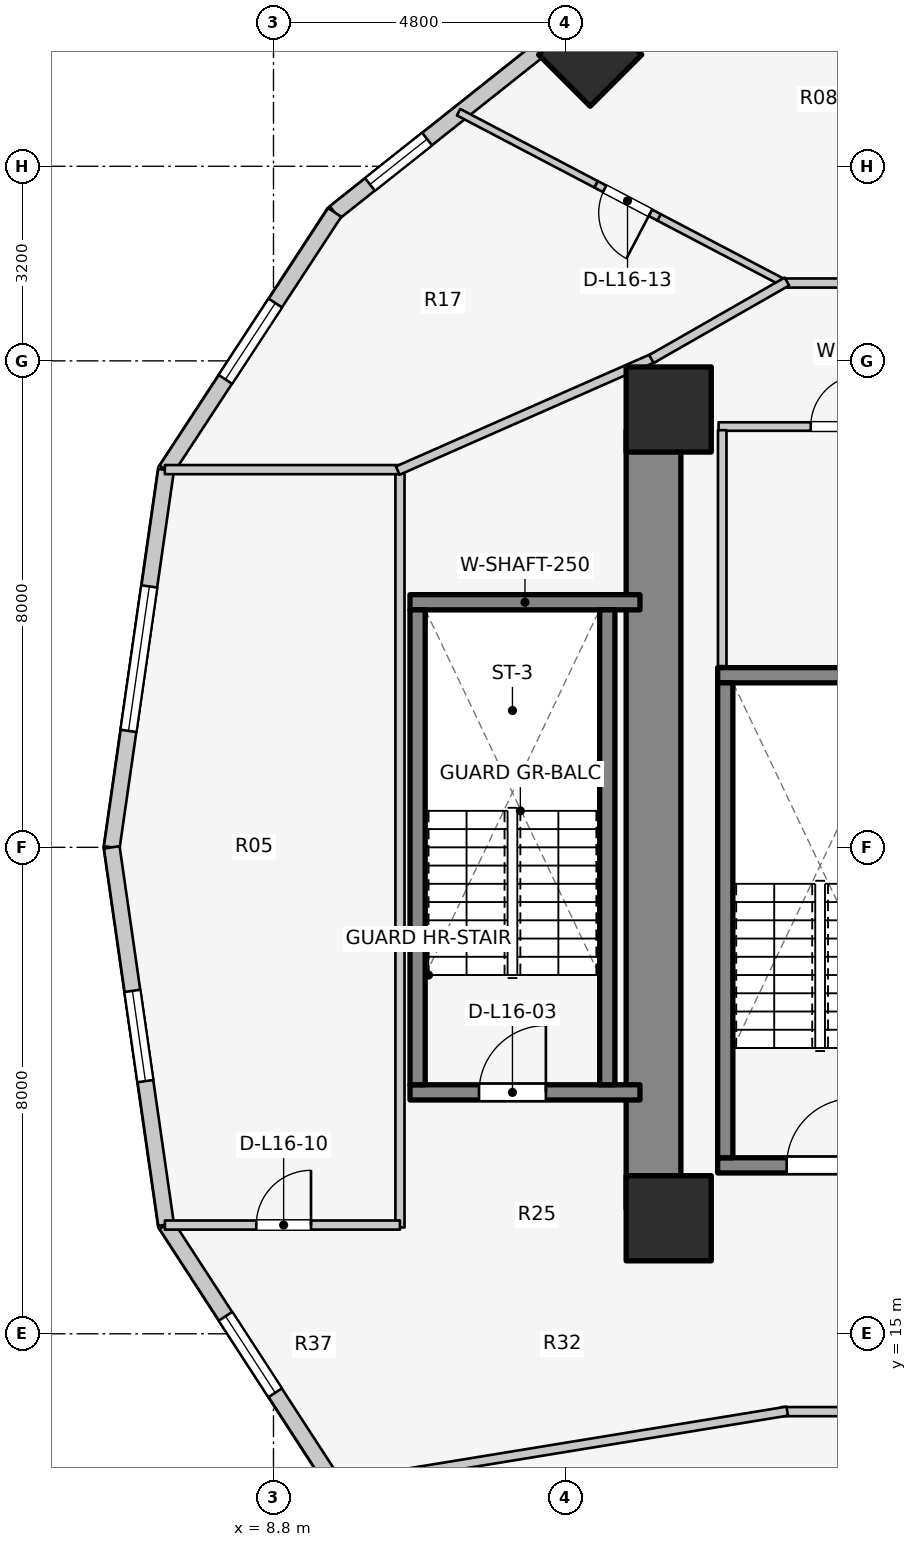
"""IFC4 building model, lengths in metres.
Left out: names, types, materials, properties, quantities, classifications, styles, units other than length and angle.
Written with IfcOpenShell. Run it as: python <this file> out.ifc"""

import sys

from ifc_helpers import new_model, si_unit, direction, frame, frame_2d, origin, origin_2d, place, context, subcontext, project, spatial, rectangle, extrude, element, fill, save


model = new_model("IFC4")
c1 = context("Model", 3, precision=1e-05, world=origin(), true_north=direction((0.0, 1.0)))
c2 = subcontext(c1, "Body", "Model", "MODEL_VIEW")
j1 = project(units=[si_unit("LENGTHUNIT", "METRE"), si_unit("PLANEANGLEUNIT", "RADIAN")], contexts=[c1])
p1 = place(None, origin())
s1 = spatial("IfcSite", under=j1, at=p1, CompositionType="ELEMENT")
p2 = place(p1, origin())
s2 = spatial("IfcBuilding", under=s1, at=p2, CompositionType="ELEMENT")
p3 = place(p2, frame((0.0, 0.0, 55.5)))
s3 = spatial("IfcBuildingStorey", under=s2, at=p3, CompositionType="ELEMENT", Elevation=55.5)
p4 = place(p3, frame((15.05, 17.05, 0.0), z_axis=(0.0, 0.0, 1.0), x_axis=(0.0, 1.0, 0.0)))
e1 = element("IfcWall", 1, at=p4, inside=s3, PredefinedType="SHEAR", context=c2, shape_type="SweptSolid", body=[
    extrude(rectangle(XDim=12.8, YDim=0.9, at=frame_2d((6.4, 0.0))), origin(), (0.0, 0.0, 1.0), 3.1),
])
p5 = place(p3, frame((16.105, 17.77, 0.0), z_axis=(0.0, 0.0, 1.0), x_axis=(1.0, 0.0, 0.0)))
e2 = element("IfcWall", 2, at=p5, inside=s3, PredefinedType="SOLIDWALL", context=c2, shape_type="SweptSolid", body=[
    extrude(rectangle(XDim=3.37, YDim=0.25, at=frame_2d((1.685, 0.0))), origin(), (0.0, 0.0, 1.0), 3.1),
])
p6 = place(p5, frame((1.135, 0.0, 0.0)))
e3 = element("IfcOpeningElement", 3, at=p6, cuts=e2, PredefinedType="OPENING", context=c2, shape_type="SweptSolid", body=[
    extrude(rectangle(XDim=1.1, YDim=2.1, at=frame_2d((0.55, 1.05))), frame((0.0, 0.135, 0.0), z_axis=(0.0, -1.0, 0.0), x_axis=(1.0, 0.0, 0.0)), (0.0, 0.0, 1.0), 0.27),
])
p7 = place(p3, frame((16.105, 25.83, 0.0), z_axis=(0.0, 0.0, 1.0), x_axis=(1.0, 0.0, 0.0)))
e4 = element("IfcWall", 4, at=p7, inside=s3, PredefinedType="SOLIDWALL", context=c2, shape_type="SweptSolid", body=[
    extrude(rectangle(XDim=3.37, YDim=0.25, at=frame_2d((1.685, 0.0))), origin(), (0.0, 0.0, 1.0), 3.1),
])
p8 = place(p3, frame((16.23, 17.895, 0.0), z_axis=(0.0, 0.0, 1.0), x_axis=(0.0, 1.0, 0.0)))
e5 = element("IfcWall", 5, at=p8, inside=s3, PredefinedType="SOLIDWALL", context=c2, shape_type="SweptSolid", body=[
    extrude(rectangle(XDim=7.81, YDim=0.25, at=frame_2d((3.905, 0.0))), origin(), (0.0, 0.0, 1.0), 3.1),
])
p9 = place(p3, frame((11.045, 18.97, 0.0), z_axis=(0.0, 0.0, 1.0), x_axis=(1.0, 0.0, 0.0)))
e6 = element("IfcWall", 6, at=p9, inside=s3, PredefinedType="SOLIDWALL", context=c2, shape_type="SweptSolid", body=[
    extrude(rectangle(XDim=3.782, YDim=0.25, at=frame_2d((1.891, 0.0))), origin(), (0.0, 0.0, 1.0), 3.1),
])
p10 = place(p9, frame((1.135, 0.0, 0.0)))
e7 = element("IfcOpeningElement", 7, at=p10, cuts=e6, PredefinedType="OPENING", context=c2, shape_type="SweptSolid", body=[
    extrude(rectangle(XDim=1.1, YDim=2.1, at=frame_2d((0.55, 1.05))), frame((0.0, 0.135, 0.0), z_axis=(0.0, -1.0, 0.0), x_axis=(1.0, 0.0, 0.0)), (0.0, 0.0, 1.0), 0.27),
])
p11 = place(p3, frame((11.045, 27.03, 0.0), z_axis=(0.0, 0.0, 1.0), x_axis=(1.0, 0.0, 0.0)))
e8 = element("IfcWall", 8, at=p11, inside=s3, PredefinedType="SOLIDWALL", context=c2, shape_type="SweptSolid", body=[
    extrude(rectangle(XDim=3.782, YDim=0.25, at=frame_2d((1.891, 0.0))), origin(), (0.0, 0.0, 1.0), 3.1),
])
for number, where, z_axis, x_axis in (
    (9, (11.17, 19.095, 0.0), (0.0, 0.0, 1.0), (0.0, 1.0, 0.0)),
    (10, (14.29, 19.095, 0.0), (0.0, 0.0, 1.0), (0.0, 1.0, 0.0)),
):
    element("IfcWall", number, at=place(p3, frame(where, z_axis=z_axis, x_axis=x_axis)), inside=s3, PredefinedType="SOLIDWALL", context=c2, shape_type="SweptSolid", body=[
        extrude(rectangle(XDim=7.81, YDim=0.25, at=frame_2d((3.905, 0.0))), origin(), (0.0, 0.0, 1.0), 3.1),
    ])
for number, where, z_axis, x_axis in (
    (11, (15.3, 16.9, 0.0), (0.0, 0.0, 1.0), (1.0, 0.0, 0.0)),
    (12, (15.3, 30.2, 0.0), (0.0, 0.0, 1.0), (1.0, 0.0, 0.0)),
):
    element("IfcColumn", number, at=place(p3, frame(where, z_axis=z_axis, x_axis=x_axis)), inside=s3, PredefinedType="COLUMN", context=c2, shape_type="SweptSolid", body=[
        extrude(rectangle(XDim=1.4, YDim=1.4, at=origin_2d()), origin(), (0.0, 0.0, 1.0), 3.1),
    ])
p12 = place(p3, frame((14.008, 36.035, 0.0), z_axis=(0.0, 0.0, 1.0), x_axis=(-0.707106781187, 0.707106781187, 0.0)))
e13 = element("IfcColumn", 13, at=p12, inside=s3, PredefinedType="COLUMN", context=c2, shape_type="SweptSolid", body=[
    extrude(rectangle(XDim=1.2, YDim=1.2, at=origin_2d()), origin(), (0.0, 0.0, 1.0), 3.1),
])
p13 = place(p3, frame((13.595, 36.45, 0.0), z_axis=(0.0, 0.0, 1.0), x_axis=(-0.783123133379, -0.621866672179, 0.0)))
e14 = element("IfcWall", 14, at=p13, inside=s3, PredefinedType="STANDARD", context=c2, shape_type="SweptSolid", body=[
    extrude(rectangle(XDim=4.839, YDim=0.26, at=frame_2d((2.419, 0.0))), origin(), (0.0, 0.0, 1.0), 2.85),
])
p14 = place(p13, frame((2.898, 0.0, 0.75)))
e15 = element("IfcOpeningElement", 15, at=p14, cuts=e14, PredefinedType="OPENING", context=c2, shape_type="SweptSolid", body=[
    extrude(rectangle(XDim=1.2, YDim=1.5, at=frame_2d((0.6, 0.75))), frame((0.0, 0.14, 0.0), z_axis=(0.0, -1.0, 0.0), x_axis=(1.0, 0.0, 0.0)), (0.0, 0.0, 1.0), 0.28),
])
p15 = place(p3, frame((9.806, 33.441, 0.0), z_axis=(0.0, 0.0, 1.0), x_axis=(-0.547702757047, -0.836672988642, 0.0)))
e16 = element("IfcWall", 16, at=p15, inside=s3, PredefinedType="STANDARD", context=c2, shape_type="SweptSolid", body=[
    extrude(rectangle(XDim=5.062, YDim=0.26, at=frame_2d((2.531, 0.0))), origin(), (0.0, 0.0, 1.0), 2.85),
])
p16 = place(p15, frame((1.781, 0.0, 0.75)))
e17 = element("IfcOpeningElement", 17, at=p16, cuts=e16, PredefinedType="OPENING", context=c2, shape_type="SweptSolid", body=[
    extrude(rectangle(XDim=1.5, YDim=1.6, at=frame_2d((0.75, 0.8))), frame((0.0, 0.14, 0.0), z_axis=(0.0, -1.0, 0.0), x_axis=(1.0, 0.0, 0.0)), (0.0, 0.0, 1.0), 0.28),
])
p17 = place(p3, frame((7.033, 29.205, 0.0), z_axis=(0.0, 0.0, 1.0), x_axis=(-0.142528001686, -0.989790770181, 0.0)))
e18 = element("IfcWall", 18, at=p17, inside=s3, PredefinedType="STANDARD", context=c2, shape_type="SweptSolid", body=[
    extrude(rectangle(XDim=6.269, YDim=0.26, at=frame_2d((3.135, 0.0))), origin(), (0.0, 0.0, 1.0), 2.85),
])
p18 = place(p17, frame((1.935, 0.0, 0.75)))
e19 = element("IfcOpeningElement", 19, at=p18, cuts=e18, PredefinedType="OPENING", context=c2, shape_type="SweptSolid", body=[
    extrude(rectangle(XDim=2.4, YDim=1.7, at=frame_2d((1.2, 0.85))), frame((0.0, 0.14, 0.0), z_axis=(0.0, -1.0, 0.0), x_axis=(1.0, 0.0, 0.0)), (0.0, 0.0, 1.0), 0.28),
])
p19 = place(p3, frame((6.14, 23.0, 0.0), z_axis=(0.0, 0.0, 1.0), x_axis=(0.142528001686, -0.989790770181, 0.0)))
e20 = element("IfcWall", 20, at=p19, inside=s3, PredefinedType="STANDARD", context=c2, shape_type="SweptSolid", body=[
    extrude(rectangle(XDim=6.269, YDim=0.26, at=frame_2d((3.135, 0.0))), origin(), (0.0, 0.0, 1.0), 2.85),
])
p20 = place(p19, frame((2.385, 0.0, 0.75)))
e21 = element("IfcOpeningElement", 21, at=p20, cuts=e20, PredefinedType="OPENING", context=c2, shape_type="SweptSolid", body=[
    extrude(rectangle(XDim=1.5, YDim=1.6, at=frame_2d((0.75, 0.8))), frame((0.0, 0.14, 0.0), z_axis=(0.0, -1.0, 0.0), x_axis=(1.0, 0.0, 0.0)), (0.0, 0.0, 1.0), 0.28),
])
p21 = place(p3, frame((7.033, 16.795, 0.0), z_axis=(0.0, 0.0, 1.0), x_axis=(0.544578722263, -0.838709732421, 0.0)))
e22 = element("IfcWall", 22, at=p21, inside=s3, PredefinedType="STANDARD", context=c2, shape_type="SweptSolid", body=[
    extrude(rectangle(XDim=5.092, YDim=0.26, at=frame_2d((2.546, 0.0))), origin(), (0.0, 0.0, 1.0), 2.85),
])
p22 = place(p21, frame((1.796, 0.0, 0.75)))
e23 = element("IfcOpeningElement", 23, at=p22, cuts=e22, PredefinedType="OPENING", context=c2, shape_type="SweptSolid", body=[
    extrude(rectangle(XDim=1.5, YDim=1.6, at=frame_2d((0.75, 0.8))), frame((0.0, 0.14, 0.0), z_axis=(0.0, -1.0, 0.0), x_axis=(1.0, 0.0, 0.0)), (0.0, 0.0, 1.0), 0.28),
])
p23 = place(p3, frame((16.12, 29.92, 0.0), z_axis=(0.0, 0.0, 1.0), x_axis=(1.0, 0.0, 0.0)))
e24 = element("IfcWall", 24, at=p23, inside=s3, PredefinedType="PLUMBINGWALL", context=c2, shape_type="SweptSolid", body=[
    extrude(rectangle(XDim=3.3, YDim=0.14, at=frame_2d((1.65, 0.0))), origin(), (0.0, 0.0, 1.0), 2.855),
])
p24 = place(p23, frame((1.516, 0.0, 0.0)))
e25 = element("IfcOpeningElement", 25, at=p24, cuts=e24, PredefinedType="OPENING", context=c2, shape_type="SweptSolid", body=[
    extrude(rectangle(XDim=0.85, YDim=2.05, at=frame_2d((0.425, 1.025))), frame((0.0, 0.08, 0.0), z_axis=(0.0, -1.0, 0.0), x_axis=(1.0, 0.0, 0.0)), (0.0, 0.0, 1.0), 0.16),
])
p25 = place(p3, frame((16.18, 25.98, 0.0), z_axis=(0.0, 0.0, 1.0), x_axis=(0.0, 1.0, 0.0)))
e26 = element("IfcWall", 26, at=p25, inside=s3, PredefinedType="PLUMBINGWALL", context=c2, shape_type="SweptSolid", body=[
    extrude(rectangle(XDim=3.88, YDim=0.14, at=frame_2d((1.94, 0.0))), origin(), (0.0, 0.0, 1.0), 2.855),
])
p26 = place(p3, frame((10.88, 16.748, 0.0), z_axis=(0.0, 0.0, 1.0), x_axis=(0.0, 1.0, 0.0)))
e27 = element("IfcWall", 27, at=p26, inside=s3, PredefinedType="PARTITIONING", context=c2, shape_type="SweptSolid", body=[
    extrude(rectangle(XDim=12.503, YDim=0.15, at=frame_2d((6.252, 0.0))), origin(), (0.0, 0.0, 1.0), 2.12),
])
p27 = place(p3, frame((7.014, 16.788, 0.0), z_axis=(0.0, 0.0, 1.0), x_axis=(1.0, 0.0, 0.0)))
e28 = element("IfcWall", 28, at=p27, inside=s3, PredefinedType="PARTITIONING", context=c2, shape_type="SweptSolid", body=[
    extrude(rectangle(XDim=3.866, YDim=0.15, at=frame_2d((1.933, 0.0))), origin(), (0.0, 0.0, 1.0), 2.855),
])
p28 = place(p27, frame((1.503, 0.0, 0.0)))
e29 = element("IfcOpeningElement", 29, at=p28, cuts=e28, PredefinedType="OPENING", context=c2, shape_type="SweptSolid", body=[
    extrude(rectangle(XDim=0.9, YDim=2.1, at=frame_2d((0.45, 1.05))), frame((0.0, 0.085, 0.0), z_axis=(0.0, -1.0, 0.0), x_axis=(1.0, 0.0, 0.0)), (0.0, 0.0, 1.0), 0.17),
])
p29 = place(p3, frame((7.014, 29.212, 0.0), z_axis=(0.0, 0.0, 1.0), x_axis=(1.0, 0.0, 0.0)))
e30 = element("IfcWall", 30, at=p29, inside=s3, PredefinedType="PARTITIONING", context=c2, shape_type="SweptSolid", body=[
    extrude(rectangle(XDim=3.866, YDim=0.15, at=frame_2d((1.933, 0.0))), origin(), (0.0, 0.0, 1.0), 2.855),
])
p30 = place(p3, frame((10.844, 29.196, 0.0), z_axis=(0.0, 0.0, 1.0), x_axis=(0.91502756289, 0.403391322604, 0.0)))
e31 = element("IfcWall", 31, at=p30, inside=s3, PredefinedType="PARTITIONING", context=c2, shape_type="SweptSolid", body=[
    extrude(rectangle(XDim=4.637, YDim=0.15, at=frame_2d((2.319, 0.0))), origin(), (0.0, 0.0, 1.0), 2.069),
])
p31 = place(p3, frame((17.244, 32.257, 0.0), z_axis=(0.0, 0.0, 1.0), x_axis=(-0.885586030676, 0.464475383924, 0.0)))
e32 = element("IfcWall", 32, at=p31, inside=s3, PredefinedType="MOVABLE", context=c2, shape_type="SweptSolid", body=[
    extrude(rectangle(XDim=2.376, YDim=0.12, at=frame_2d((1.188, 0.0))), origin(), (0.0, 0.0, 1.0), 2.855),
])
p32 = place(p3, frame((15.14, 33.36, 0.0), z_axis=(0.0, 0.0, 1.0), x_axis=(-0.885447282698, 0.464739829972, 0.0)))
e33 = element("IfcWall", 33, at=p32, inside=s3, PredefinedType="MOVABLE", context=c2, shape_type="SweptSolid", body=[
    extrude(rectangle(XDim=1.17, YDim=0.12, at=frame_2d((0.585, 0.0))), origin(), (0.0, 0.0, 1.0), 2.11),
])
p33 = place(p32, frame((0.16, 0.0, 0.0)))
e34 = element("IfcOpeningElement", 34, at=p33, cuts=e33, PredefinedType="OPENING", context=c2, shape_type="SweptSolid", body=[
    extrude(rectangle(XDim=0.85, YDim=2.05, at=frame_2d((0.425, 1.025))), frame((0.0, 0.07, 0.0), z_axis=(0.0, -1.0, 0.0), x_axis=(1.0, 0.0, 0.0)), (0.0, 0.0, 1.0), 0.14),
])
p34 = place(p3, frame((14.104, 33.904, 0.0), z_axis=(0.0, 0.0, 1.0), x_axis=(-0.885573027611, 0.464500175208, 0.0)))
e35 = element("IfcWall", 35, at=p34, inside=s3, PredefinedType="MOVABLE", context=c2, shape_type="SweptSolid", body=[
    extrude(rectangle(XDim=2.552, YDim=0.12, at=frame_2d((1.276, 0.0))), origin(), (0.0, 0.0, 1.0), 2.855),
])
p35 = place(p3, frame((17.15, 32.28, 0.0), z_axis=(0.0, 0.0, 1.0), x_axis=(1.0, 0.0, 0.0)))
e36 = element("IfcWall", 36, at=p35, inside=s3, PredefinedType="PARTITIONING", context=c2, shape_type="SweptSolid", body=[
    extrude(rectangle(XDim=7.52, YDim=0.15, at=frame_2d((3.76, 0.0))), origin(), (0.0, 0.0, 1.0), 2.237),
])
p36 = place(p35, frame((1.3, 0.0, 0.0)))
e37 = element("IfcOpeningElement", 37, at=p36, cuts=e36, PredefinedType="OPENING", context=c2, shape_type="SweptSolid", body=[
    extrude(rectangle(XDim=0.9, YDim=2.1, at=frame_2d((0.45, 1.05))), frame((0.0, 0.085, 0.0), z_axis=(0.0, -1.0, 0.0), x_axis=(1.0, 0.0, 0.0)), (0.0, 0.0, 1.0), 0.17),
])
p37 = place(p3, frame((17.243, 32.305, 0.0), z_axis=(0.0, 0.0, 1.0), x_axis=(-0.867991349648, -0.496579315857, 0.0)))
e38 = element("IfcWall", 38, at=p37, inside=s3, PredefinedType="PARTITIONING", context=c2, shape_type="SweptSolid", body=[
    extrude(rectangle(XDim=2.567, YDim=0.15, at=frame_2d((1.283, 0.0))), origin(), (0.0, 0.0, 1.0), 2.069),
])
p38 = place(p3, frame((17.15, 13.72, 0.0), z_axis=(0.0, 0.0, 1.0), x_axis=(1.0, 0.0, 0.0)))
e39 = element("IfcWall", 39, at=p38, inside=s3, PredefinedType="PARTITIONING", context=c2, shape_type="SweptSolid", body=[
    extrude(rectangle(XDim=7.52, YDim=0.15, at=frame_2d((3.76, 0.0))), origin(), (0.0, 0.0, 1.0), 2.237),
])
p39 = place(p38, frame((1.3, 0.0, 0.0)))
e40 = element("IfcOpeningElement", 40, at=p39, cuts=e39, PredefinedType="OPENING", context=c2, shape_type="SweptSolid", body=[
    extrude(rectangle(XDim=0.9, YDim=2.1, at=frame_2d((0.45, 1.05))), frame((0.0, 0.085, 0.0), z_axis=(0.0, -1.0, 0.0), x_axis=(1.0, 0.0, 0.0)), (0.0, 0.0, 1.0), 0.17),
])
p40 = place(p3, frame((17.249, 13.728, 0.0), z_axis=(0.0, 0.0, 1.0), x_axis=(-0.98693078372, -0.161144742846, 0.0)))
e41 = element("IfcWall", 41, at=p40, inside=s3, PredefinedType="PARTITIONING", context=c2, shape_type="SweptSolid", body=[
    extrude(rectangle(XDim=7.557, YDim=0.15, at=frame_2d((3.779, 0.0))), origin(), (0.0, 0.0, 1.0), 2.069),
])
p41 = place(p14, origin())
e42 = element("IfcWindow", 42, at=p41, inside=s3, PartitioningType="SINGLE_PANEL", PredefinedType="WINDOW", context=c2, shape_type="SweptSolid", body=[
    extrude(rectangle(XDim=1.2, YDim=1.5, at=frame_2d((0.6, 0.75))), frame((0.0, 0.03, 0.0), z_axis=(0.0, -1.0, 0.0), x_axis=(1.0, 0.0, 0.0)), (0.0, 0.0, 1.0), 0.06),
])
fill(e15, e42)
p42 = place(p16, origin())
e43 = element("IfcWindow", 43, at=p42, inside=s3, PartitioningType="SINGLE_PANEL", PredefinedType="WINDOW", context=c2, shape_type="SweptSolid", body=[
    extrude(rectangle(XDim=1.5, YDim=1.6, at=frame_2d((0.75, 0.8))), frame((0.0, 0.03, 0.0), z_axis=(0.0, -1.0, 0.0), x_axis=(1.0, 0.0, 0.0)), (0.0, 0.0, 1.0), 0.06),
])
fill(e17, e43)
p43 = place(p18, origin())
e44 = element("IfcWindow", 44, at=p43, inside=s3, PartitioningType="SINGLE_PANEL", PredefinedType="WINDOW", context=c2, shape_type="SweptSolid", body=[
    extrude(rectangle(XDim=2.4, YDim=1.7, at=frame_2d((1.2, 0.85))), frame((0.0, 0.03, 0.0), z_axis=(0.0, -1.0, 0.0), x_axis=(1.0, 0.0, 0.0)), (0.0, 0.0, 1.0), 0.06),
])
fill(e19, e44)
p44 = place(p20, origin())
e45 = element("IfcWindow", 45, at=p44, inside=s3, PartitioningType="SINGLE_PANEL", PredefinedType="WINDOW", context=c2, shape_type="SweptSolid", body=[
    extrude(rectangle(XDim=1.5, YDim=1.6, at=frame_2d((0.75, 0.8))), frame((0.0, 0.03, 0.0), z_axis=(0.0, -1.0, 0.0), x_axis=(1.0, 0.0, 0.0)), (0.0, 0.0, 1.0), 0.06),
])
fill(e21, e45)
p45 = place(p22, origin())
e46 = element("IfcWindow", 46, at=p45, inside=s3, PartitioningType="SINGLE_PANEL", PredefinedType="WINDOW", context=c2, shape_type="SweptSolid", body=[
    extrude(rectangle(XDim=1.5, YDim=1.6, at=frame_2d((0.75, 0.8))), frame((0.0, 0.03, 0.0), z_axis=(0.0, -1.0, 0.0), x_axis=(1.0, 0.0, 0.0)), (0.0, 0.0, 1.0), 0.06),
])
fill(e23, e46)
p46 = place(p6, origin())
e47 = element("IfcDoor", 47, at=p46, inside=s3, OperationType="SINGLE_SWING_RIGHT", PredefinedType="DOOR", context=c2, shape_type="SweptSolid", body=[
    extrude(rectangle(XDim=1.1, YDim=2.1, at=frame_2d((0.55, 1.05))), frame((0.0, 0.025, 0.0), z_axis=(0.0, -1.0, 0.0), x_axis=(1.0, 0.0, 0.0)), (0.0, 0.0, 1.0), 0.05),
])
fill(e3, e47)
p47 = place(p10, origin())
e48 = element("IfcDoor", 48, at=p47, inside=s3, OperationType="SINGLE_SWING_RIGHT", PredefinedType="DOOR", context=c2, shape_type="SweptSolid", body=[
    extrude(rectangle(XDim=1.1, YDim=2.1, at=frame_2d((0.55, 1.05))), frame((0.0, 0.025, 0.0), z_axis=(0.0, -1.0, 0.0), x_axis=(1.0, 0.0, 0.0)), (0.0, 0.0, 1.0), 0.05),
])
fill(e7, e48)
p48 = place(p24, origin())
e49 = element("IfcDoor", 49, at=p48, inside=s3, OperationType="SINGLE_SWING_RIGHT", PredefinedType="DOOR", context=c2, shape_type="SweptSolid", body=[
    extrude(rectangle(XDim=0.85, YDim=2.05, at=frame_2d((0.425, 1.025))), frame((0.0, 0.025, 0.0), z_axis=(0.0, -1.0, 0.0), x_axis=(1.0, 0.0, 0.0)), (0.0, 0.0, 1.0), 0.05),
])
fill(e25, e49)
p49 = place(p28, origin())
e50 = element("IfcDoor", 50, at=p49, inside=s3, OperationType="SINGLE_SWING_RIGHT", PredefinedType="DOOR", context=c2, shape_type="SweptSolid", body=[
    extrude(rectangle(XDim=0.9, YDim=2.1, at=frame_2d((0.45, 1.05))), frame((0.0, 0.025, 0.0), z_axis=(0.0, -1.0, 0.0), x_axis=(1.0, 0.0, 0.0)), (0.0, 0.0, 1.0), 0.05),
])
fill(e29, e50)
p50 = place(p33, origin())
e51 = element("IfcDoor", 51, at=p50, inside=s3, OperationType="SINGLE_SWING_LEFT", PredefinedType="DOOR", context=c2, shape_type="SweptSolid", body=[
    extrude(rectangle(XDim=0.85, YDim=2.05, at=frame_2d((0.425, 1.025))), frame((0.0, 0.025, 0.0), z_axis=(0.0, -1.0, 0.0), x_axis=(1.0, 0.0, 0.0)), (0.0, 0.0, 1.0), 0.05),
])
fill(e34, e51)
save(model, sys.argv[1])
